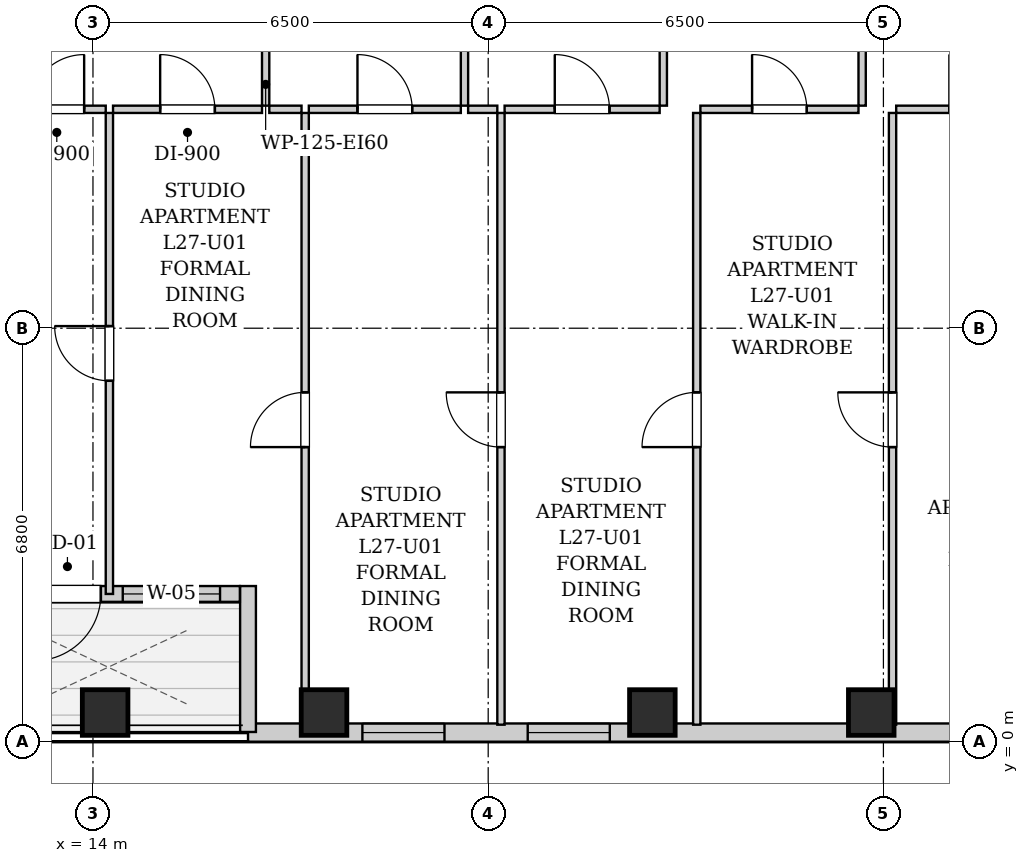
"""IFC4 building model, lengths in metres.
Left out: names, types, materials, properties, quantities, classifications, styles, units other than length and angle.
Written with IfcOpenShell. Run it as: python <this file> out.ifc"""

import sys

from ifc_helpers import new_model, si_unit, direction, frame, frame_2d, origin, origin_2d, place, context, subcontext, project, spatial, rectangle, extrude, element, fill, save


model = new_model("IFC4")
c1 = context("Model", 3, precision=1e-05, world=origin(), true_north=direction((0.0, 1.0)))
c2 = subcontext(c1, "Body", "Model", "MODEL_VIEW")
j1 = project(units=[si_unit("LENGTHUNIT", "METRE"), si_unit("PLANEANGLEUNIT", "RADIAN")], contexts=[c1])
p1 = place(None, origin())
s1 = spatial("IfcSite", under=j1, at=p1, CompositionType="ELEMENT")
p2 = place(p1, origin())
s2 = spatial("IfcBuilding", under=s1, at=p2, CompositionType="ELEMENT")
p3 = place(p2, frame((0.0, 0.0, 97.5)))
s3 = spatial("IfcBuildingStorey", under=s2, at=p3, CompositionType="ELEMENT", Elevation=97.5)
for number, where, z_axis, x_axis in (
    (1, (14.2, 0.48, 0.0), (0.0, 0.0, 1.0), (1.0, 0.0, 0.0)),
    (2, (17.8, 0.48, 0.0), (0.0, 0.0, 1.0), (1.0, 0.0, 0.0)),
    (3, (23.2, 0.48, 0.0), (0.0, 0.0, 1.0), (1.0, 0.0, 0.0)),
    (4, (26.8, 0.48, 0.0), (0.0, 0.0, 1.0), (1.0, 0.0, 0.0)),
):
    element("IfcColumn", number, at=place(p3, frame(where, z_axis=z_axis, x_axis=x_axis)), inside=s3, PredefinedType="COLUMN", context=c2, shape_type="SweptSolid", body=[
        extrude(rectangle(XDim=0.75, YDim=0.75, at=origin_2d()), origin(), (0.0, 0.0, 1.0), 3.2),
    ])
p4 = place(p3, frame((40.9, 0.15, 0.0), z_axis=(0.0, 0.0, 1.0), x_axis=(-1.0, 0.0, 0.0)))
e5 = element("IfcWall", 5, at=p4, inside=s3, PredefinedType="SOLIDWALL", context=c2, shape_type="SweptSolid", body=[
    extrude(rectangle(XDim=24.35, YDim=0.3, at=frame_2d((12.175, 0.0))), origin(), (0.0, 0.0, 1.0), 2.94),
])
p5 = place(p4, frame((21.119, 0.0, 0.55)))
e6 = element("IfcOpeningElement", 6, at=p5, cuts=e5, PredefinedType="OPENING", context=c2, shape_type="SweptSolid", body=[
    extrude(rectangle(XDim=1.35, YDim=1.2, at=frame_2d((0.675, 0.6))), frame((0.0, 0.16, 0.0), z_axis=(0.0, -1.0, 0.0), x_axis=(1.0, 0.0, 0.0)), (0.0, 0.0, 1.0), 0.32),
])
p6 = place(p4, frame((18.4, 0.0, 0.55)))
e7 = element("IfcOpeningElement", 7, at=p6, cuts=e5, PredefinedType="OPENING", context=c2, shape_type="SweptSolid", body=[
    extrude(rectangle(XDim=1.35, YDim=1.2, at=frame_2d((0.675, 0.6))), frame((0.0, 0.16, 0.0), z_axis=(0.0, -1.0, 0.0), x_axis=(1.0, 0.0, 0.0)), (0.0, 0.0, 1.0), 0.32),
])
p7 = place(p4, frame((11.424, 0.0, 0.55)))
e8 = element("IfcOpeningElement", 8, at=p7, cuts=e5, PredefinedType="OPENING", context=c2, shape_type="SweptSolid", body=[
    extrude(rectangle(XDim=1.35, YDim=1.2, at=frame_2d((0.675, 0.6))), frame((0.0, 0.16, 0.0), z_axis=(0.0, -1.0, 0.0), x_axis=(1.0, 0.0, 0.0)), (0.0, 0.0, 1.0), 0.32),
])
p8 = place(p4, frame((8.268, 0.0, 0.55)))
e9 = element("IfcOpeningElement", 9, at=p8, cuts=e5, PredefinedType="OPENING", context=c2, shape_type="SweptSolid", body=[
    extrude(rectangle(XDim=1.35, YDim=1.2, at=frame_2d((0.675, 0.6))), frame((0.0, 0.16, 0.0), z_axis=(0.0, -1.0, 0.0), x_axis=(1.0, 0.0, 0.0)), (0.0, 0.0, 1.0), 0.32),
])
p9 = place(p4, frame((5.037, 0.0, 0.55)))
e10 = element("IfcOpeningElement", 10, at=p9, cuts=e5, PredefinedType="OPENING", context=c2, shape_type="SweptSolid", body=[
    extrude(rectangle(XDim=1.35, YDim=1.2, at=frame_2d((0.675, 0.6))), frame((0.0, 0.16, 0.0), z_axis=(0.0, -1.0, 0.0), x_axis=(1.0, 0.0, 0.0)), (0.0, 0.0, 1.0), 0.32),
])
p10 = place(p3, frame((16.55, 0.16, 0.0), z_axis=(0.0, 0.0, 1.0), x_axis=(0.0, 1.0, 0.0)))
e11 = element("IfcWall", 11, at=p10, inside=s3, PredefinedType="SOLIDWALL", context=c2, shape_type="SweptSolid", body=[
    extrude(rectangle(XDim=2.4, YDim=0.26, at=frame_2d((1.2, 0.0))), origin(), (0.0, 0.0, 1.0), 2.94),
])
p11 = place(p3, frame((16.416, 2.43, 0.0), z_axis=(0.0, 0.0, 1.0), x_axis=(-1.0, 0.0, 0.0)))
e12 = element("IfcWall", 12, at=p11, inside=s3, PredefinedType="SOLIDWALL", context=c2, shape_type="SweptSolid", body=[
    extrude(rectangle(XDim=4.332, YDim=0.26, at=frame_2d((2.166, 0.0))), origin(), (0.0, 0.0, 1.0), 2.94),
])
p12 = place(p11, frame((2.286, 0.0, 0.0)))
e13 = element("IfcOpeningElement", 13, at=p12, cuts=e12, PredefinedType="OPENING", context=c2, shape_type="SweptSolid", body=[
    extrude(rectangle(XDim=1.1, YDim=2.0, at=frame_2d((0.55, 1.0))), frame((0.0, 0.14, 0.0), z_axis=(0.0, -1.0, 0.0), x_axis=(1.0, 0.0, 0.0)), (0.0, 0.0, 1.0), 0.28),
])
p13 = place(p11, frame((0.326, 0.0, 0.85)))
e14 = element("IfcOpeningElement", 14, at=p13, cuts=e12, PredefinedType="OPENING", context=c2, shape_type="SweptSolid", body=[
    extrude(rectangle(XDim=1.6, YDim=1.65, at=frame_2d((0.8, 0.825))), frame((0.0, 0.14, 0.0), z_axis=(0.0, -1.0, 0.0), x_axis=(1.0, 0.0, 0.0)), (0.0, 0.0, 1.0), 0.28),
])
p14 = place(p3, frame((16.84, 10.46, 0.0), z_axis=(0.0, 0.0, 1.0), x_axis=(0.0, 1.0, 0.0)))
e15 = element("IfcWall", 15, at=p14, inside=s3, PredefinedType="PARTITIONING", context=c2, shape_type="SweptSolid", body=[
    extrude(rectangle(XDim=2.85, YDim=0.12, at=frame_2d((1.425, 0.0))), origin(), (0.0, 0.0, 1.0), 2.94),
])
p15 = place(p14, frame((0.975, 0.0, 0.0)))
e16 = element("IfcOpeningElement", 16, at=p15, cuts=e15, PredefinedType="OPENING", context=c2, shape_type="SweptSolid", body=[
    extrude(rectangle(XDim=0.9, YDim=2.05, at=frame_2d((0.45, 1.025))), frame((0.0, 0.07, 0.0), z_axis=(0.0, -1.0, 0.0), x_axis=(1.0, 0.0, 0.0)), (0.0, 0.0, 1.0), 0.14),
])
p16 = place(p3, frame((12.6, 10.4, 0.0), z_axis=(0.0, 0.0, 1.0), x_axis=(1.0, 0.0, 0.0)))
e17 = element("IfcWall", 17, at=p16, inside=s3, PredefinedType="PARTITIONING", context=c2, shape_type="SweptSolid", body=[
    extrude(rectangle(XDim=1.61, YDim=0.12, at=frame_2d((0.805, 0.0))), origin(), (0.0, 0.0, 1.0), 2.94),
])
p17 = place(p16, frame((0.355, 0.0, 0.0)))
e18 = element("IfcOpeningElement", 18, at=p17, cuts=e17, PredefinedType="OPENING", context=c2, shape_type="SweptSolid", body=[
    extrude(rectangle(XDim=0.9, YDim=2.05, at=frame_2d((0.45, 1.025))), frame((0.0, 0.07, 0.0), z_axis=(0.0, -1.0, 0.0), x_axis=(1.0, 0.0, 0.0)), (0.0, 0.0, 1.0), 0.14),
])
p18 = place(p3, frame((14.33, 10.4, 0.0), z_axis=(0.0, 0.0, 1.0), x_axis=(1.0, 0.0, 0.0)))
e19 = element("IfcWall", 19, at=p18, inside=s3, PredefinedType="PARTITIONING", context=c2, shape_type="SweptSolid", body=[
    extrude(rectangle(XDim=2.45, YDim=0.12, at=frame_2d((1.225, 0.0))), origin(), (0.0, 0.0, 1.0), 2.94),
])
p19 = place(p18, frame((0.775, 0.0, 0.0)))
e20 = element("IfcOpeningElement", 20, at=p19, cuts=e19, PredefinedType="OPENING", context=c2, shape_type="SweptSolid", body=[
    extrude(rectangle(XDim=0.9, YDim=2.05, at=frame_2d((0.45, 1.025))), frame((0.0, 0.07, 0.0), z_axis=(0.0, -1.0, 0.0), x_axis=(1.0, 0.0, 0.0)), (0.0, 0.0, 1.0), 0.14),
])
p20 = place(p3, frame((20.11, 10.46, 0.0), z_axis=(0.0, 0.0, 1.0), x_axis=(0.0, 1.0, 0.0)))
e21 = element("IfcWall", 21, at=p20, inside=s3, PredefinedType="PARTITIONING", context=c2, shape_type="SweptSolid", body=[
    extrude(rectangle(XDim=2.85, YDim=0.12, at=frame_2d((1.425, 0.0))), origin(), (0.0, 0.0, 1.0), 2.94),
])
p21 = place(p20, frame((0.975, 0.0, 0.0)))
e22 = element("IfcOpeningElement", 22, at=p21, cuts=e21, PredefinedType="OPENING", context=c2, shape_type="SweptSolid", body=[
    extrude(rectangle(XDim=0.9, YDim=2.05, at=frame_2d((0.45, 1.025))), frame((0.0, 0.07, 0.0), z_axis=(0.0, -1.0, 0.0), x_axis=(1.0, 0.0, 0.0)), (0.0, 0.0, 1.0), 0.14),
])
p22 = place(p3, frame((16.9, 10.4, 0.0), z_axis=(0.0, 0.0, 1.0), x_axis=(1.0, 0.0, 0.0)))
e23 = element("IfcWall", 23, at=p22, inside=s3, PredefinedType="PARTITIONING", context=c2, shape_type="SweptSolid", body=[
    extrude(rectangle(XDim=0.53, YDim=0.12, at=frame_2d((0.265, 0.0))), origin(), (0.0, 0.0, 1.0), 2.94),
])
p23 = place(p3, frame((17.55, 10.4, 0.0), z_axis=(0.0, 0.0, 1.0), x_axis=(1.0, 0.0, 0.0)))
e24 = element("IfcWall", 24, at=p23, inside=s3, PredefinedType="PARTITIONING", context=c2, shape_type="SweptSolid", body=[
    extrude(rectangle(XDim=2.5, YDim=0.12, at=frame_2d((1.25, 0.0))), origin(), (0.0, 0.0, 1.0), 2.94),
])
p24 = place(p23, frame((0.8, 0.0, 0.0)))
e25 = element("IfcOpeningElement", 25, at=p24, cuts=e24, PredefinedType="OPENING", context=c2, shape_type="SweptSolid", body=[
    extrude(rectangle(XDim=0.9, YDim=2.05, at=frame_2d((0.45, 1.025))), frame((0.0, 0.07, 0.0), z_axis=(0.0, -1.0, 0.0), x_axis=(1.0, 0.0, 0.0)), (0.0, 0.0, 1.0), 0.14),
])
p25 = place(p3, frame((23.38, 10.46, 0.0), z_axis=(0.0, 0.0, 1.0), x_axis=(0.0, 1.0, 0.0)))
e26 = element("IfcWall", 26, at=p25, inside=s3, PredefinedType="PARTITIONING", context=c2, shape_type="SweptSolid", body=[
    extrude(rectangle(XDim=2.85, YDim=0.12, at=frame_2d((1.425, 0.0))), origin(), (0.0, 0.0, 1.0), 2.94),
])
p26 = place(p25, frame((0.975, 0.0, 0.0)))
e27 = element("IfcOpeningElement", 27, at=p26, cuts=e26, PredefinedType="OPENING", context=c2, shape_type="SweptSolid", body=[
    extrude(rectangle(XDim=0.9, YDim=2.05, at=frame_2d((0.45, 1.025))), frame((0.0, 0.07, 0.0), z_axis=(0.0, -1.0, 0.0), x_axis=(1.0, 0.0, 0.0)), (0.0, 0.0, 1.0), 0.14),
])
p27 = place(p3, frame((20.17, 10.4, 0.0), z_axis=(0.0, 0.0, 1.0), x_axis=(1.0, 0.0, 0.0)))
e28 = element("IfcWall", 28, at=p27, inside=s3, PredefinedType="PARTITIONING", context=c2, shape_type="SweptSolid", body=[
    extrude(rectangle(XDim=0.48, YDim=0.12, at=frame_2d((0.24, 0.0))), origin(), (0.0, 0.0, 1.0), 2.94),
])
p28 = place(p3, frame((20.77, 10.4, 0.0), z_axis=(0.0, 0.0, 1.0), x_axis=(1.0, 0.0, 0.0)))
e29 = element("IfcWall", 29, at=p28, inside=s3, PredefinedType="PARTITIONING", context=c2, shape_type="SweptSolid", body=[
    extrude(rectangle(XDim=2.55, YDim=0.12, at=frame_2d((1.275, 0.0))), origin(), (0.0, 0.0, 1.0), 2.94),
])
p29 = place(p28, frame((0.825, 0.0, 0.0)))
e30 = element("IfcOpeningElement", 30, at=p29, cuts=e29, PredefinedType="OPENING", context=c2, shape_type="SweptSolid", body=[
    extrude(rectangle(XDim=0.9, YDim=2.05, at=frame_2d((0.45, 1.025))), frame((0.0, 0.07, 0.0), z_axis=(0.0, -1.0, 0.0), x_axis=(1.0, 0.0, 0.0)), (0.0, 0.0, 1.0), 0.14),
])
p30 = place(p3, frame((26.65, 10.46, 0.0), z_axis=(0.0, 0.0, 1.0), x_axis=(0.0, 1.0, 0.0)))
e31 = element("IfcWall", 31, at=p30, inside=s3, PredefinedType="PARTITIONING", context=c2, shape_type="SweptSolid", body=[
    extrude(rectangle(XDim=2.85, YDim=0.12, at=frame_2d((1.425, 0.0))), origin(), (0.0, 0.0, 1.0), 2.94),
])
p31 = place(p30, frame((0.975, 0.0, 0.0)))
e32 = element("IfcOpeningElement", 32, at=p31, cuts=e31, PredefinedType="OPENING", context=c2, shape_type="SweptSolid", body=[
    extrude(rectangle(XDim=0.9, YDim=2.05, at=frame_2d((0.45, 1.025))), frame((0.0, 0.07, 0.0), z_axis=(0.0, -1.0, 0.0), x_axis=(1.0, 0.0, 0.0)), (0.0, 0.0, 1.0), 0.14),
])
p32 = place(p3, frame((23.99, 10.4, 0.0), z_axis=(0.0, 0.0, 1.0), x_axis=(1.0, 0.0, 0.0)))
e33 = element("IfcWall", 33, at=p32, inside=s3, PredefinedType="PARTITIONING", context=c2, shape_type="SweptSolid", body=[
    extrude(rectangle(XDim=2.6, YDim=0.12, at=frame_2d((1.3, 0.0))), origin(), (0.0, 0.0, 1.0), 2.94),
])
p33 = place(p32, frame((0.85, 0.0, 0.0)))
e34 = element("IfcOpeningElement", 34, at=p33, cuts=e33, PredefinedType="OPENING", context=c2, shape_type="SweptSolid", body=[
    extrude(rectangle(XDim=0.9, YDim=2.05, at=frame_2d((0.45, 1.025))), frame((0.0, 0.07, 0.0), z_axis=(0.0, -1.0, 0.0), x_axis=(1.0, 0.0, 0.0)), (0.0, 0.0, 1.0), 0.14),
])
p34 = place(p3, frame((27.21, 10.4, 0.0), z_axis=(0.0, 0.0, 1.0), x_axis=(1.0, 0.0, 0.0)))
e35 = element("IfcWall", 35, at=p34, inside=s3, PredefinedType="PARTITIONING", context=c2, shape_type="SweptSolid", body=[
    extrude(rectangle(XDim=2.65, YDim=0.12, at=frame_2d((1.325, 0.0))), origin(), (0.0, 0.0, 1.0), 2.94),
])
p35 = place(p34, frame((0.875, 0.0, 0.0)))
e36 = element("IfcOpeningElement", 36, at=p35, cuts=e35, PredefinedType="OPENING", context=c2, shape_type="SweptSolid", body=[
    extrude(rectangle(XDim=0.9, YDim=2.05, at=frame_2d((0.45, 1.025))), frame((0.0, 0.07, 0.0), z_axis=(0.0, -1.0, 0.0), x_axis=(1.0, 0.0, 0.0)), (0.0, 0.0, 1.0), 0.14),
])
p36 = place(p3, frame((14.27, 2.43, 0.0), z_axis=(0.0, 0.0, 1.0), x_axis=(0.0, 1.0, 0.0)))
e37 = element("IfcWall", 37, at=p36, inside=s3, PredefinedType="PARTITIONING", context=c2, shape_type="SweptSolid", body=[
    extrude(rectangle(XDim=7.91, YDim=0.12, at=frame_2d((3.955, 0.0))), origin(), (0.0, 0.0, 1.0), 2.94),
])
p37 = place(p36, frame((3.505, 0.0, 0.0)))
e38 = element("IfcOpeningElement", 38, at=p37, cuts=e37, PredefinedType="OPENING", context=c2, shape_type="SweptSolid", body=[
    extrude(rectangle(XDim=0.9, YDim=2.05, at=frame_2d((0.45, 1.025))), frame((0.0, 0.07, 0.0), z_axis=(0.0, -1.0, 0.0), x_axis=(1.0, 0.0, 0.0)), (0.0, 0.0, 1.0), 0.14),
])
p38 = place(p3, frame((17.49, 0.28, 0.0), z_axis=(0.0, 0.0, 1.0), x_axis=(0.0, 1.0, 0.0)))
e39 = element("IfcWall", 39, at=p38, inside=s3, PredefinedType="PARTITIONING", context=c2, shape_type="SweptSolid", body=[
    extrude(rectangle(XDim=10.06, YDim=0.12, at=frame_2d((5.03, 0.0))), origin(), (0.0, 0.0, 1.0), 2.94),
])
p39 = place(p38, frame((4.565, 0.0, 0.0)))
e40 = element("IfcOpeningElement", 40, at=p39, cuts=e39, PredefinedType="OPENING", context=c2, shape_type="SweptSolid", body=[
    extrude(rectangle(XDim=0.9, YDim=2.05, at=frame_2d((0.45, 1.025))), frame((0.0, 0.07, 0.0), z_axis=(0.0, -1.0, 0.0), x_axis=(1.0, 0.0, 0.0)), (0.0, 0.0, 1.0), 0.14),
])
p40 = place(p3, frame((20.71, 0.28, 0.0), z_axis=(0.0, 0.0, 1.0), x_axis=(0.0, 1.0, 0.0)))
e41 = element("IfcWall", 41, at=p40, inside=s3, PredefinedType="PARTITIONING", context=c2, shape_type="SweptSolid", body=[
    extrude(rectangle(XDim=10.06, YDim=0.12, at=frame_2d((5.03, 0.0))), origin(), (0.0, 0.0, 1.0), 2.94),
])
p41 = place(p40, frame((4.565, 0.0, 0.0)))
e42 = element("IfcOpeningElement", 42, at=p41, cuts=e41, PredefinedType="OPENING", context=c2, shape_type="SweptSolid", body=[
    extrude(rectangle(XDim=0.9, YDim=2.05, at=frame_2d((0.45, 1.025))), frame((0.0, 0.07, 0.0), z_axis=(0.0, -1.0, 0.0), x_axis=(1.0, 0.0, 0.0)), (0.0, 0.0, 1.0), 0.14),
])
p42 = place(p3, frame((23.93, 0.28, 0.0), z_axis=(0.0, 0.0, 1.0), x_axis=(0.0, 1.0, 0.0)))
e43 = element("IfcWall", 43, at=p42, inside=s3, PredefinedType="PARTITIONING", context=c2, shape_type="SweptSolid", body=[
    extrude(rectangle(XDim=10.06, YDim=0.12, at=frame_2d((5.03, 0.0))), origin(), (0.0, 0.0, 1.0), 2.94),
])
p43 = place(p42, frame((4.565, 0.0, 0.0)))
e44 = element("IfcOpeningElement", 44, at=p43, cuts=e43, PredefinedType="OPENING", context=c2, shape_type="SweptSolid", body=[
    extrude(rectangle(XDim=0.9, YDim=2.05, at=frame_2d((0.45, 1.025))), frame((0.0, 0.07, 0.0), z_axis=(0.0, -1.0, 0.0), x_axis=(1.0, 0.0, 0.0)), (0.0, 0.0, 1.0), 0.14),
])
p44 = place(p3, frame((27.15, 0.28, 0.0), z_axis=(0.0, 0.0, 1.0), x_axis=(0.0, 1.0, 0.0)))
e45 = element("IfcWall", 45, at=p44, inside=s3, PredefinedType="PARTITIONING", context=c2, shape_type="SweptSolid", body=[
    extrude(rectangle(XDim=10.06, YDim=0.12, at=frame_2d((5.03, 0.0))), origin(), (0.0, 0.0, 1.0), 2.94),
])
p45 = place(p44, frame((4.565, 0.0, 0.0)))
e46 = element("IfcOpeningElement", 46, at=p45, cuts=e45, PredefinedType="OPENING", context=c2, shape_type="SweptSolid", body=[
    extrude(rectangle(XDim=0.9, YDim=2.05, at=frame_2d((0.45, 1.025))), frame((0.0, 0.07, 0.0), z_axis=(0.0, -1.0, 0.0), x_axis=(1.0, 0.0, 0.0)), (0.0, 0.0, 1.0), 0.14),
])
p46 = place(p17, origin())
e47 = element("IfcDoor", 47, at=p46, inside=s3, OperationType="SINGLE_SWING_RIGHT", PredefinedType="DOOR", context=c2, shape_type="SweptSolid", body=[
    extrude(rectangle(XDim=0.9, YDim=2.05, at=frame_2d((0.45, 1.025))), frame((0.0, 0.025, 0.0), z_axis=(0.0, -1.0, 0.0), x_axis=(1.0, 0.0, 0.0)), (0.0, 0.0, 1.0), 0.05),
])
fill(e18, e47)
p47 = place(p19, origin())
e48 = element("IfcDoor", 48, at=p47, inside=s3, OperationType="SINGLE_SWING_LEFT", PredefinedType="DOOR", context=c2, shape_type="SweptSolid", body=[
    extrude(rectangle(XDim=0.9, YDim=2.05, at=frame_2d((0.45, 1.025))), frame((0.0, 0.025, 0.0), z_axis=(0.0, -1.0, 0.0), x_axis=(1.0, 0.0, 0.0)), (0.0, 0.0, 1.0), 0.05),
])
fill(e20, e48)
p48 = place(p24, origin())
e49 = element("IfcDoor", 49, at=p48, inside=s3, OperationType="SINGLE_SWING_LEFT", PredefinedType="DOOR", context=c2, shape_type="SweptSolid", body=[
    extrude(rectangle(XDim=0.9, YDim=2.05, at=frame_2d((0.45, 1.025))), frame((0.0, 0.025, 0.0), z_axis=(0.0, -1.0, 0.0), x_axis=(1.0, 0.0, 0.0)), (0.0, 0.0, 1.0), 0.05),
])
fill(e25, e49)
p49 = place(p29, origin())
e50 = element("IfcDoor", 50, at=p49, inside=s3, OperationType="SINGLE_SWING_LEFT", PredefinedType="DOOR", context=c2, shape_type="SweptSolid", body=[
    extrude(rectangle(XDim=0.9, YDim=2.05, at=frame_2d((0.45, 1.025))), frame((0.0, 0.025, 0.0), z_axis=(0.0, -1.0, 0.0), x_axis=(1.0, 0.0, 0.0)), (0.0, 0.0, 1.0), 0.05),
])
fill(e30, e50)
p50 = place(p33, origin())
e51 = element("IfcDoor", 51, at=p50, inside=s3, OperationType="SINGLE_SWING_LEFT", PredefinedType="DOOR", context=c2, shape_type="SweptSolid", body=[
    extrude(rectangle(XDim=0.9, YDim=2.05, at=frame_2d((0.45, 1.025))), frame((0.0, 0.025, 0.0), z_axis=(0.0, -1.0, 0.0), x_axis=(1.0, 0.0, 0.0)), (0.0, 0.0, 1.0), 0.05),
])
fill(e34, e51)
p51 = place(p35, origin())
e52 = element("IfcDoor", 52, at=p51, inside=s3, OperationType="SINGLE_SWING_LEFT", PredefinedType="DOOR", context=c2, shape_type="SweptSolid", body=[
    extrude(rectangle(XDim=0.9, YDim=2.05, at=frame_2d((0.45, 1.025))), frame((0.0, 0.025, 0.0), z_axis=(0.0, -1.0, 0.0), x_axis=(1.0, 0.0, 0.0)), (0.0, 0.0, 1.0), 0.05),
])
fill(e36, e52)
p52 = place(p37, origin())
e53 = element("IfcDoor", 53, at=p52, inside=s3, OperationType="SINGLE_SWING_RIGHT", PredefinedType="DOOR", context=c2, shape_type="SweptSolid", body=[
    extrude(rectangle(XDim=0.9, YDim=2.05, at=frame_2d((0.45, 1.025))), frame((0.0, 0.025, 0.0), z_axis=(0.0, -1.0, 0.0), x_axis=(1.0, 0.0, 0.0)), (0.0, 0.0, 1.0), 0.05),
])
fill(e38, e53)
p53 = place(p39, origin())
e54 = element("IfcDoor", 54, at=p53, inside=s3, OperationType="SINGLE_SWING_LEFT", PredefinedType="DOOR", context=c2, shape_type="SweptSolid", body=[
    extrude(rectangle(XDim=0.9, YDim=2.05, at=frame_2d((0.45, 1.025))), frame((0.0, 0.025, 0.0), z_axis=(0.0, -1.0, 0.0), x_axis=(1.0, 0.0, 0.0)), (0.0, 0.0, 1.0), 0.05),
])
fill(e40, e54)
p54 = place(p41, origin())
e55 = element("IfcDoor", 55, at=p54, inside=s3, OperationType="SINGLE_SWING_RIGHT", PredefinedType="DOOR", context=c2, shape_type="SweptSolid", body=[
    extrude(rectangle(XDim=0.9, YDim=2.05, at=frame_2d((0.45, 1.025))), frame((0.0, 0.025, 0.0), z_axis=(0.0, -1.0, 0.0), x_axis=(1.0, 0.0, 0.0)), (0.0, 0.0, 1.0), 0.05),
])
fill(e42, e55)
p55 = place(p43, origin())
e56 = element("IfcDoor", 56, at=p55, inside=s3, OperationType="SINGLE_SWING_LEFT", PredefinedType="DOOR", context=c2, shape_type="SweptSolid", body=[
    extrude(rectangle(XDim=0.9, YDim=2.05, at=frame_2d((0.45, 1.025))), frame((0.0, 0.025, 0.0), z_axis=(0.0, -1.0, 0.0), x_axis=(1.0, 0.0, 0.0)), (0.0, 0.0, 1.0), 0.05),
])
fill(e44, e56)
p56 = place(p45, origin())
e57 = element("IfcDoor", 57, at=p56, inside=s3, OperationType="SINGLE_SWING_RIGHT", PredefinedType="DOOR", context=c2, shape_type="SweptSolid", body=[
    extrude(rectangle(XDim=0.9, YDim=2.05, at=frame_2d((0.45, 1.025))), frame((0.0, 0.025, 0.0), z_axis=(0.0, -1.0, 0.0), x_axis=(1.0, 0.0, 0.0)), (0.0, 0.0, 1.0), 0.05),
])
fill(e46, e57)
p57 = place(p12, origin())
e58 = element("IfcDoor", 58, at=p57, inside=s3, OperationType="SINGLE_SWING_RIGHT", PredefinedType="DOOR", context=c2, shape_type="SweptSolid", body=[
    extrude(rectangle(XDim=1.1, YDim=2.0, at=frame_2d((0.55, 1.0))), frame((0.0, 0.025, 0.0), z_axis=(0.0, -1.0, 0.0), x_axis=(1.0, 0.0, 0.0)), (0.0, 0.0, 1.0), 0.05),
])
fill(e13, e58)
p58 = place(p13, origin())
e59 = element("IfcWindow", 59, at=p58, inside=s3, PartitioningType="DOUBLE_PANEL_VERTICAL", PredefinedType="WINDOW", context=c2, shape_type="SweptSolid", body=[
    extrude(rectangle(XDim=1.6, YDim=1.65, at=frame_2d((0.8, 0.825))), frame((0.0, 0.03, 0.0), z_axis=(0.0, -1.0, 0.0), x_axis=(1.0, 0.0, 0.0)), (0.0, 0.0, 1.0), 0.06),
])
fill(e14, e59)
p59 = place(p5, origin())
e60 = element("IfcWindow", 60, at=p59, inside=s3, PartitioningType="SINGLE_PANEL", PredefinedType="WINDOW", context=c2, shape_type="SweptSolid", body=[
    extrude(rectangle(XDim=1.35, YDim=1.2, at=frame_2d((0.675, 0.6))), frame((0.0, 0.03, 0.0), z_axis=(0.0, -1.0, 0.0), x_axis=(1.0, 0.0, 0.0)), (0.0, 0.0, 1.0), 0.06),
])
fill(e6, e60)
p60 = place(p6, origin())
e61 = element("IfcWindow", 61, at=p60, inside=s3, PartitioningType="SINGLE_PANEL", PredefinedType="WINDOW", context=c2, shape_type="SweptSolid", body=[
    extrude(rectangle(XDim=1.35, YDim=1.2, at=frame_2d((0.675, 0.6))), frame((0.0, 0.03, 0.0), z_axis=(0.0, -1.0, 0.0), x_axis=(1.0, 0.0, 0.0)), (0.0, 0.0, 1.0), 0.06),
])
fill(e7, e61)
save(model, sys.argv[1])
